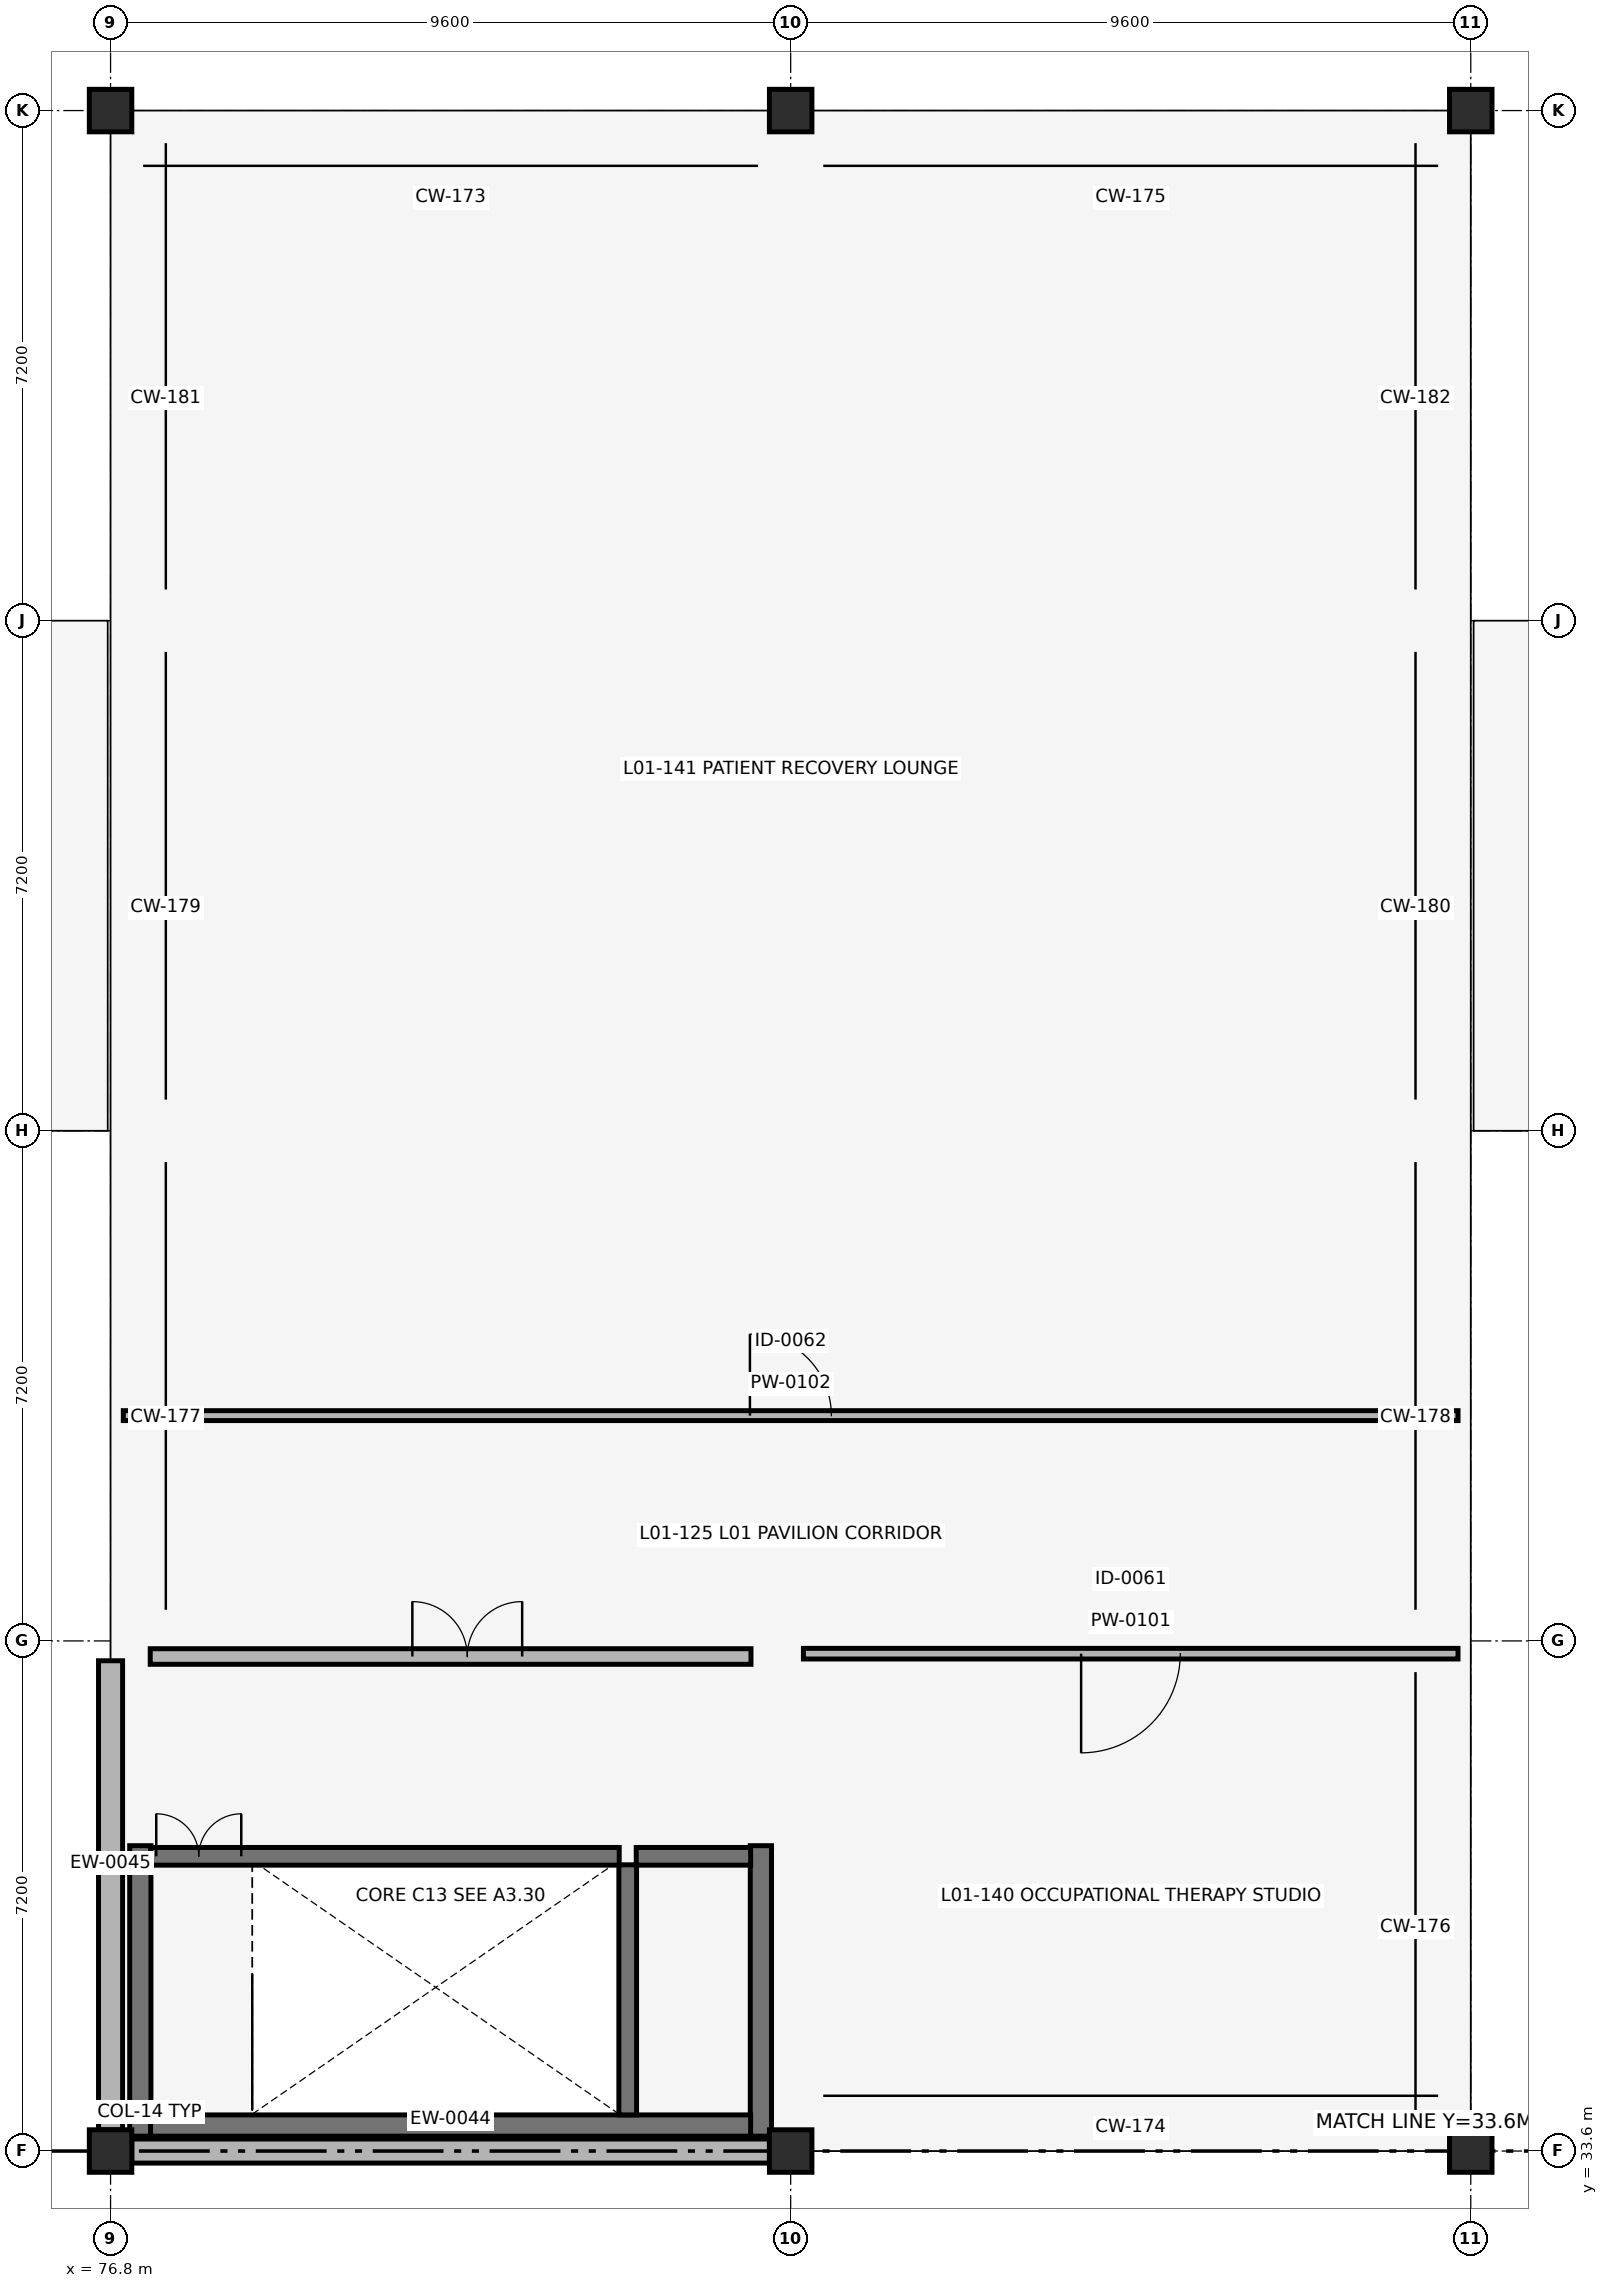
"""IFC4 building model, lengths in metres.
Left out: names, types, materials, properties, quantities, classifications, styles, units other than length and angle.
Written with IfcOpenShell. Run it as: python <this file> out.ifc"""

import sys

from ifc_helpers import new_model, si_unit, direction, frame, frame_2d, origin, origin_2d, place, context, subcontext, project, spatial, rectangle, circle, extrude, element, fill, save


model = new_model("IFC4")
c1 = context("Model", 3, precision=1e-05, world=origin(), true_north=direction((0.0, 1.0)))
c2 = subcontext(c1, "Body", "Model", "MODEL_VIEW")
j1 = project(units=[si_unit("LENGTHUNIT", "METRE"), si_unit("PLANEANGLEUNIT", "RADIAN")], contexts=[c1])
p1 = place(None, origin())
s1 = spatial("IfcSite", under=j1, at=p1, CompositionType="ELEMENT")
p2 = place(p1, origin())
s2 = spatial("IfcBuilding", under=s1, at=p2, CompositionType="ELEMENT")
p3 = place(p2, frame((0.0, 0.0, 4.42)))
s3 = spatial("IfcBuildingStorey", under=s2, at=p3, CompositionType="ELEMENT", Elevation=4.42)
for number, where, z_axis, x_axis in (
    (1, (76.8, 33.6, 0.0), (0.0, 0.0, 1.0), (1.0, 0.0, 0.0)),
    (2, (76.8, 62.4, 0.0), (0.0, 0.0, 1.0), (1.0, 0.0, 0.0)),
    (3, (86.4, 33.6, 0.0), (0.0, 0.0, 1.0), (1.0, 0.0, 0.0)),
    (4, (86.4, 62.4, 0.0), (0.0, 0.0, 1.0), (1.0, 0.0, 0.0)),
    (5, (96.0, 33.6, 0.0), (0.0, 0.0, 1.0), (1.0, 0.0, 0.0)),
    (6, (96.0, 62.4, 0.0), (0.0, 0.0, 1.0), (1.0, 0.0, 0.0)),
):
    element("IfcColumn", number, at=place(p3, frame(where, z_axis=z_axis, x_axis=x_axis)), inside=s3, PredefinedType="COLUMN", context=c2, shape_type="SweptSolid", body=[
        extrude(circle(Radius=0.3, at=origin_2d()), origin(), (0.0, 0.0, 1.0), 4.28),
    ])
p4 = place(p3, frame((77.1, 33.6, 0.0), z_axis=(0.0, 0.0, 1.0), x_axis=(1.0, 0.0, 0.0)))
e7 = element("IfcWall", 7, at=p4, inside=s3, PredefinedType="SOLIDWALL", context=c2, shape_type="SweptSolid", body=[
    extrude(rectangle(XDim=9.0, YDim=0.34, at=frame_2d((4.5, 0.0))), origin(), (0.0, 0.0, 1.0), 3.63),
])
p5 = place(p3, frame((76.8, 40.52, 0.0), z_axis=(0.0, 0.0, 1.0), x_axis=(0.0, -1.0, 0.0)))
e8 = element("IfcWall", 8, at=p5, inside=s3, PredefinedType="SOLIDWALL", context=c2, shape_type="SweptSolid", body=[
    extrude(rectangle(XDim=6.62, YDim=0.34, at=frame_2d((3.31, 0.0))), origin(), (0.0, 0.0, 1.0), 3.63),
])
for number, where, z_axis, x_axis in (
    (9, (77.22, 33.81, 0.0), (0.0, 0.0, 1.0), (0.0, 1.0, 0.0)),
    (10, (85.98, 33.81, 0.0), (0.0, 0.0, 1.0), (0.0, 1.0, 0.0)),
):
    element("IfcWall", number, at=place(p3, frame(where, z_axis=z_axis, x_axis=x_axis)), inside=s3, PredefinedType="SHEAR", context=c2, shape_type="SweptSolid", body=[
        extrude(rectangle(XDim=4.1, YDim=0.3, at=frame_2d((2.05, 0.0))), origin(), (0.0, 0.0, 1.0), 3.82),
    ])
p6 = place(p3, frame((77.365, 33.96, 0.0), z_axis=(0.0, 0.0, 1.0), x_axis=(1.0, 0.0, 0.0)))
e11 = element("IfcWall", 11, at=p6, inside=s3, PredefinedType="SHEAR", context=c2, shape_type="SweptSolid", body=[
    extrude(rectangle(XDim=8.47, YDim=0.3, at=frame_2d((4.235, 0.0))), origin(), (0.0, 0.0, 1.0), 3.82),
])
p7 = place(p3, frame((84.1, 34.11, 0.0), z_axis=(0.0, 0.0, 1.0), x_axis=(0.0, 1.0, 0.0)))
e12 = element("IfcWall", 12, at=p7, inside=s3, PredefinedType="SHEAR", context=c2, shape_type="SweptSolid", body=[
    extrude(rectangle(XDim=3.53, YDim=0.25, at=frame_2d((1.765, 0.0))), origin(), (0.0, 0.0, 1.0), 3.82),
])
p8 = place(p3, frame((77.365, 37.76, 0.0), z_axis=(0.0, 0.0, 1.0), x_axis=(1.0, 0.0, 0.0)))
e13 = element("IfcWall", 13, at=p8, inside=s3, PredefinedType="SHEAR", context=c2, shape_type="SweptSolid", body=[
    extrude(rectangle(XDim=6.615, YDim=0.25, at=frame_2d((3.308, 0.0))), origin(), (0.0, 0.0, 1.0), 3.82),
])
p9 = place(p8, frame((0.08, 0.0, 0.0)))
e14 = element("IfcOpeningElement", 14, at=p9, cuts=e13, PredefinedType="OPENING", context=c2, shape_type="SweptSolid", body=[
    extrude(rectangle(XDim=1.2, YDim=2.15, at=frame_2d((0.6, 1.075))), frame((0.0, 0.135, 0.0), z_axis=(0.0, -1.0, 0.0), x_axis=(1.0, 0.0, 0.0)), (0.0, 0.0, 1.0), 0.27),
])
p10 = place(p3, frame((77.36, 40.58, 0.0), z_axis=(0.0, 0.0, 1.0), x_axis=(1.0, 0.0, 0.0)))
e15 = element("IfcWall", 15, at=p10, inside=s3, PredefinedType="PARTITIONING", context=c2, shape_type="SweptSolid", body=[
    extrude(rectangle(XDim=8.48, YDim=0.22, at=frame_2d((4.24, 0.0))), origin(), (0.0, 0.0, 1.0), 3.77),
])
p11 = place(p10, frame((3.7, 0.0, 0.0)))
e16 = element("IfcOpeningElement", 16, at=p11, cuts=e15, PredefinedType="OPENING", context=c2, shape_type="SweptSolid", body=[
    extrude(rectangle(XDim=1.55, YDim=2.2, at=frame_2d((0.775, 1.1))), frame((0.0, 0.12, 0.0), z_axis=(0.0, -1.0, 0.0), x_axis=(1.0, 0.0, 0.0)), (0.0, 0.0, 1.0), 0.24),
])
p12 = place(p3, frame((84.22, 37.76, 0.0), z_axis=(0.0, 0.0, 1.0), x_axis=(1.0, 0.0, 0.0)))
e17 = element("IfcWall", 17, at=p12, inside=s3, PredefinedType="SHEAR", context=c2, shape_type="SweptSolid", body=[
    extrude(rectangle(XDim=1.615, YDim=0.25, at=frame_2d((0.808, 0.0))), origin(), (0.0, 0.0, 1.0), 3.82),
])
p13 = place(p3, frame((86.58, 40.62, 0.0), z_axis=(0.0, 0.0, 1.0), x_axis=(1.0, 0.0, 0.0)))
e18 = element("IfcWall", 18, at=p13, inside=s3, PredefinedType="PARTITIONING", context=c2, shape_type="SweptSolid", body=[
    extrude(rectangle(XDim=9.24, YDim=0.15, at=frame_2d((4.62, 0.0))), origin(), (0.0, 0.0, 1.0), 3.12),
])
p14 = place(p13, frame((3.92, 0.0, 0.0)))
e19 = element("IfcOpeningElement", 19, at=p14, cuts=e18, PredefinedType="OPENING", context=c2, shape_type="SweptSolid", body=[
    extrude(rectangle(XDim=1.4, YDim=2.12, at=frame_2d((0.7, 1.06))), frame((0.0, 0.085, 0.0), z_axis=(0.0, -1.0, 0.0), x_axis=(1.0, 0.0, 0.0)), (0.0, 0.0, 1.0), 0.17),
])
p15 = place(p3, frame((76.98, 43.98, 0.0), z_axis=(0.0, 0.0, 1.0), x_axis=(1.0, 0.0, 0.0)))
e20 = element("IfcWall", 20, at=p15, inside=s3, PredefinedType="PARTITIONING", context=c2, shape_type="SweptSolid", body=[
    extrude(rectangle(XDim=18.84, YDim=0.14, at=frame_2d((9.42, 0.0))), origin(), (0.0, 0.0, 1.0), 3.12),
])
p16 = place(p15, frame((8.845, 0.0, 0.0)))
e21 = element("IfcOpeningElement", 21, at=p16, cuts=e20, PredefinedType="OPENING", context=c2, shape_type="SweptSolid", body=[
    extrude(rectangle(XDim=1.15, YDim=2.1, at=frame_2d((0.575, 1.05))), frame((0.0, 0.08, 0.0), z_axis=(0.0, -1.0, 0.0), x_axis=(1.0, 0.0, 0.0)), (0.0, 0.0, 1.0), 0.16),
])
p17 = place(p9, origin())
e22 = element("IfcDoor", 22, at=p17, inside=s3, OperationType="DOUBLE_DOOR_SINGLE_SWING", PredefinedType="DOOR", context=c2, shape_type="SweptSolid", body=[
    extrude(rectangle(XDim=1.2, YDim=2.15, at=frame_2d((0.6, 1.075))), frame((0.0, 0.025, 0.0), z_axis=(0.0, -1.0, 0.0), x_axis=(1.0, 0.0, 0.0)), (0.0, 0.0, 1.0), 0.05),
])
fill(e14, e22)
p18 = place(p11, origin())
e23 = element("IfcDoor", 23, at=p18, inside=s3, OperationType="DOUBLE_DOOR_SINGLE_SWING", PredefinedType="DOOR", context=c2, shape_type="SweptSolid", body=[
    extrude(rectangle(XDim=1.55, YDim=2.2, at=frame_2d((0.775, 1.1))), frame((0.0, 0.025, 0.0), z_axis=(0.0, -1.0, 0.0), x_axis=(1.0, 0.0, 0.0)), (0.0, 0.0, 1.0), 0.05),
])
fill(e16, e23)
p19 = place(p14, origin())
e24 = element("IfcDoor", 24, at=p19, inside=s3, OperationType="SINGLE_SWING_RIGHT", PredefinedType="DOOR", context=c2, shape_type="SweptSolid", body=[
    extrude(rectangle(XDim=1.4, YDim=2.12, at=frame_2d((0.7, 1.06))), frame((0.0, 0.025, 0.0), z_axis=(0.0, -1.0, 0.0), x_axis=(1.0, 0.0, 0.0)), (0.0, 0.0, 1.0), 0.05),
])
fill(e19, e24)
p20 = place(p16, origin())
e25 = element("IfcDoor", 25, at=p20, inside=s3, OperationType="SINGLE_SWING_LEFT", PredefinedType="DOOR", context=c2, shape_type="SweptSolid", body=[
    extrude(rectangle(XDim=1.15, YDim=2.1, at=frame_2d((0.575, 1.05))), frame((0.0, 0.025, 0.0), z_axis=(0.0, -1.0, 0.0), x_axis=(1.0, 0.0, 0.0)), (0.0, 0.0, 1.0), 0.05),
])
fill(e21, e25)
save(model, sys.argv[1])
